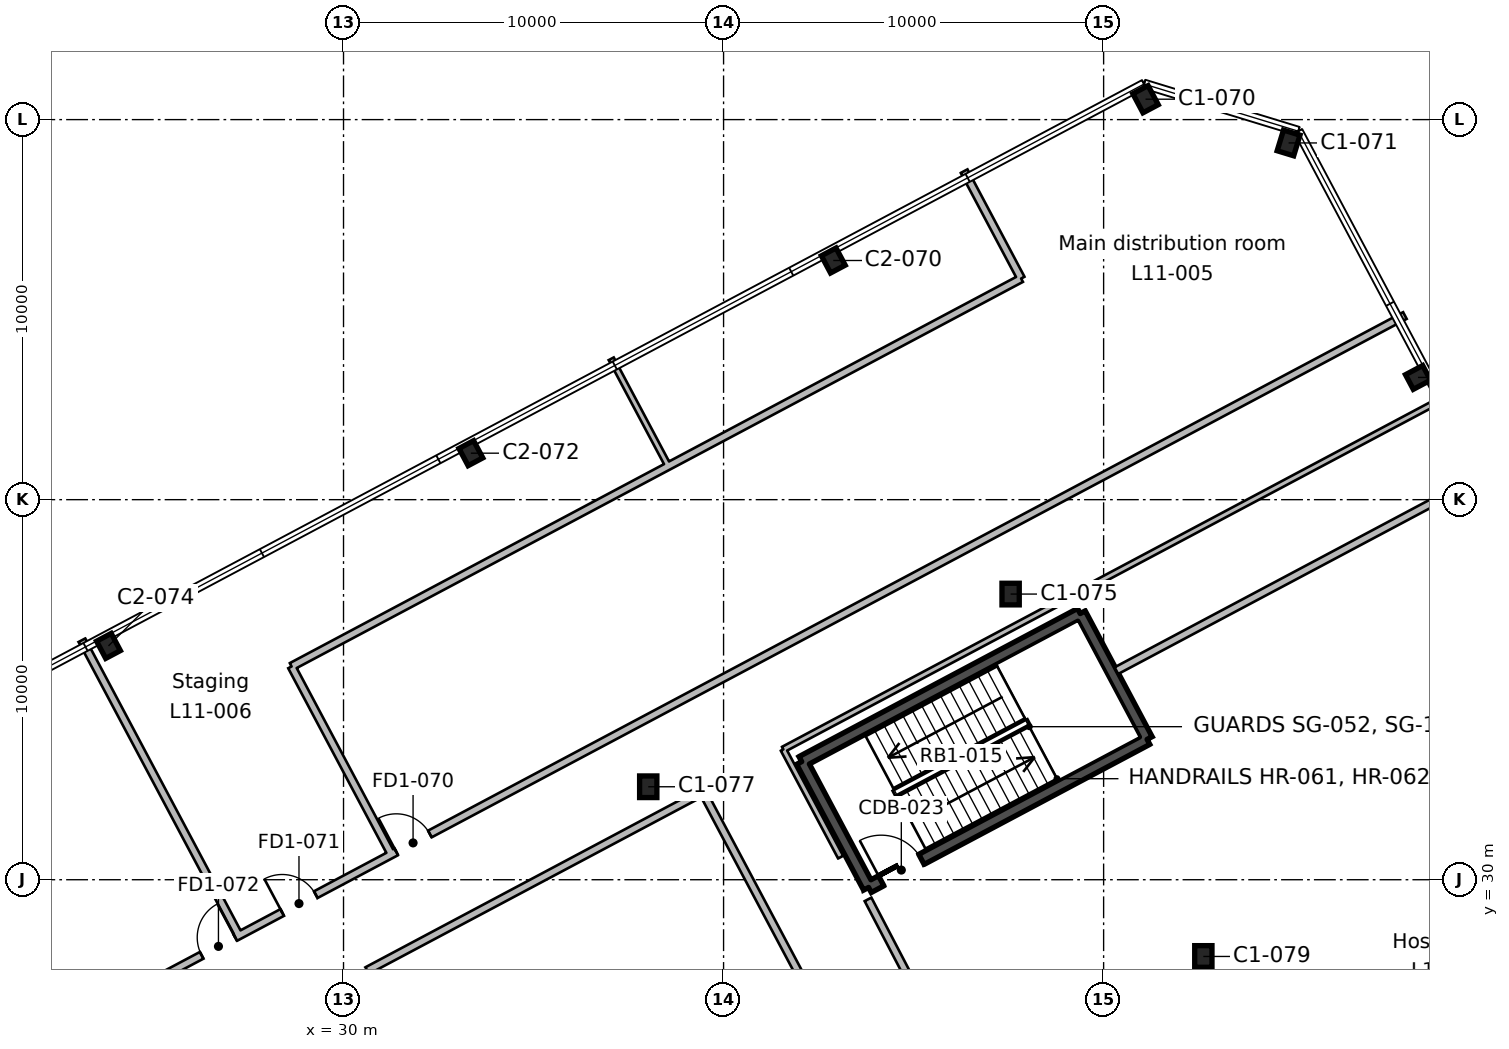
"""IFC4 building model, lengths in metres.
Left out: names, types, materials, properties, quantities, classifications, styles, units other than length and angle.
Written with IfcOpenShell. Run it as: python <this file> out.ifc"""

import sys

from ifc_helpers import new_model, si_unit, direction, frame, frame_2d, origin, origin_2d, place, context, subcontext, project, spatial, rectangle, i_section, extrude, element, fill, save


model = new_model("IFC4")
c1 = context("Model", 3, precision=1e-05, world=origin(), true_north=direction((0.0, 1.0)))
c2 = subcontext(c1, "Body", "Model", "MODEL_VIEW")
j1 = project(units=[si_unit("LENGTHUNIT", "METRE"), si_unit("PLANEANGLEUNIT", "RADIAN")], contexts=[c1])
p1 = place(None, origin())
s1 = spatial("IfcSite", under=j1, at=p1, CompositionType="ELEMENT")
p2 = place(p1, origin())
s2 = spatial("IfcBuilding", under=s1, at=p2, CompositionType="ELEMENT")
p3 = place(p2, frame((0.0, 0.0, 60.8)))
s3 = spatial("IfcBuildingStorey", under=s2, at=p3, CompositionType="ELEMENT", Elevation=60.8)
for number, where, z_axis, x_axis in (
    (1, (52.624, 27.981, 0.0), (0.0, 0.0, 1.0), (1.0, 0.0, 0.0)),
    (2, (38.018, 32.446, 0.0), (0.0, 0.0, 1.0), (1.0, 0.0, 0.0)),
):
    element("IfcColumn", number, at=place(p3, frame(where, z_axis=z_axis, x_axis=x_axis)), inside=s3, PredefinedType="COLUMN", context=c2, shape_type="SweptSolid", body=[
        extrude(i_section(OverallWidth=0.455, OverallDepth=0.569, WebThickness=0.078, FlangeThickness=0.125, FilletRadius=0.015, at=origin_2d()), origin(), (0.0, 0.0, 1.0), 5.4),
    ])
p4 = place(p3, frame((23.815, 36.152, 0.0), z_axis=(0.0, 0.0, 1.0), x_axis=(-0.882947592859, -0.469471562786, 0.0)))
e3 = element("IfcColumn", 3, at=p4, inside=s3, PredefinedType="COLUMN", context=c2, shape_type="SweptSolid", body=[
    extrude(i_section(OverallWidth=0.437, OverallDepth=0.513, WebThickness=0.061, FlangeThickness=0.097, FilletRadius=0.015, at=origin_2d()), origin(), (0.0, 0.0, 1.0), 5.4),
])
p5 = place(p3, frame((47.553, 37.516, 0.0), z_axis=(0.0, 0.0, 1.0), x_axis=(1.0, 0.0, 0.0)))
e4 = element("IfcColumn", 4, at=p5, inside=s3, PredefinedType="COLUMN", context=c2, shape_type="SweptSolid", body=[
    extrude(i_section(OverallWidth=0.455, OverallDepth=0.569, WebThickness=0.078, FlangeThickness=0.125, FilletRadius=0.015, at=origin_2d()), origin(), (0.0, 0.0, 1.0), 5.4),
])
for number, where, z_axis, x_axis in (
    (5, (33.351, 41.223, 0.0), (0.0, 0.0, 1.0), (-0.883, -0.469, 0.0)),
    (6, (58.272, 43.216, 0.0), (0.0, 0.0, 1.0), (-0.469, 0.883, 0.0)),
    (7, (42.887, 46.293, 0.0), (0.0, 0.0, 1.0), (-0.883, -0.469, 0.0)),
):
    element("IfcColumn", number, at=place(p3, frame(where, z_axis=z_axis, x_axis=x_axis)), inside=s3, PredefinedType="COLUMN", context=c2, shape_type="SweptSolid", body=[
        extrude(i_section(OverallWidth=0.437, OverallDepth=0.513, WebThickness=0.061, FlangeThickness=0.097, FilletRadius=0.015, at=origin_2d()), origin(), (0.0, 0.0, 1.0), 5.4),
    ])
for number, where, z_axis, x_axis in (
    (8, (54.867, 49.386, 0.0), (0.0, 0.0, 1.0), (-0.956, 0.292, 0.0)),
    (9, (51.103, 50.537, 0.0), (0.0, 0.0, 1.0), (-0.883, -0.469, 0.0)),
):
    element("IfcColumn", number, at=place(p3, frame(where, z_axis=z_axis, x_axis=x_axis)), inside=s3, PredefinedType="COLUMN", context=c2, shape_type="SweptSolid", body=[
        extrude(i_section(OverallWidth=0.455, OverallDepth=0.569, WebThickness=0.078, FlangeThickness=0.125, FilletRadius=0.015, at=origin_2d()), origin(), (0.0, 0.0, 1.0), 5.4),
    ])
p6 = place(p3, frame((49.384, 37.004, 0.0), z_axis=(0.0, 0.0, 1.0), x_axis=(0.46946936446, -0.882948761726, 0.0)))
e10 = element("IfcWall", 10, at=p6, inside=s3, PredefinedType="SHEAR", context=c2, shape_type="SweptSolid", body=[
    extrude(rectangle(XDim=3.75, YDim=0.3, at=frame_2d((1.875, 0.0))), origin(), (0.0, 0.0, 1.0), 5.4),
])
p7 = place(p3, frame((51.145, 33.693, 0.0), z_axis=(0.0, 0.0, 1.0), x_axis=(-0.882945809314, -0.469474917132, 0.0)))
e11 = element("IfcWall", 11, at=p7, inside=s3, PredefinedType="SHEAR", context=c2, shape_type="SweptSolid", body=[
    extrude(rectangle(XDim=8.3, YDim=0.3, at=frame_2d((4.15, 0.0))), origin(), (0.0, 0.0, 1.0), 5.4),
])
p8 = place(p7, frame((6.725, 0.0, 0.0)))
e12 = element("IfcOpeningElement", 12, at=p8, cuts=e11, PredefinedType="OPENING", context=c2, shape_type="SweptSolid", body=[
    extrude(rectangle(XDim=1.2, YDim=2.1, at=frame_2d((0.6, 1.05))), frame((0.0, 0.16, 0.0), z_axis=(0.0, -1.0, 0.0), x_axis=(1.0, 0.0, 0.0)), (0.0, 0.0, 1.0), 0.32),
])
p9 = place(p3, frame((43.816, 29.796, 0.0), z_axis=(0.0, 0.0, 1.0), x_axis=(-0.46946936446, 0.882948761726, 0.0)))
e13 = element("IfcWall", 13, at=p9, inside=s3, PredefinedType="SHEAR", context=c2, shape_type="SweptSolid", body=[
    extrude(rectangle(XDim=3.75, YDim=0.3, at=frame_2d((1.875, 0.0))), origin(), (0.0, 0.0, 1.0), 5.4),
])
p10 = place(p3, frame((42.055, 33.107, 0.0), z_axis=(0.0, 0.0, 1.0), x_axis=(0.882945809314, 0.469474917132, 0.0)))
e14 = element("IfcWall", 14, at=p10, inside=s3, PredefinedType="SHEAR", context=c2, shape_type="SweptSolid", body=[
    extrude(rectangle(XDim=8.3, YDim=0.3, at=frame_2d((4.15, 0.0))), origin(), (0.0, 0.0, 1.0), 5.4),
])
p11 = place(p3, frame((0.0, 14.044, 0.0), z_axis=(0.0, 0.0, 1.0), x_axis=(0.882943219941, 0.469479786955, 0.0)))
e15 = element("IfcWall", 15, at=p11, inside=s3, PredefinedType="PARTITIONING", context=c2, shape_type="SweptSolid", body=[
    extrude(rectangle(XDim=65.607, YDim=0.2, at=frame_2d((32.803, 0.0))), origin(), (0.0, 0.0, 1.0), 5.0),
])
p12 = place(p11, frame((35.55, 0.0, 0.0)))
e16 = element("IfcOpeningElement", 16, at=p12, cuts=e15, PredefinedType="OPENING", context=c2, shape_type="SweptSolid", body=[
    extrude(rectangle(XDim=1.0, YDim=2.1, at=frame_2d((0.5, 1.05))), frame((0.0, 0.11, 0.0), z_axis=(0.0, -1.0, 0.0), x_axis=(1.0, 0.0, 0.0)), (0.0, 0.0, 1.0), 0.22),
])
p13 = place(p11, frame((32.15, 0.0, 0.0)))
e17 = element("IfcOpeningElement", 17, at=p13, cuts=e15, PredefinedType="OPENING", context=c2, shape_type="SweptSolid", body=[
    extrude(rectangle(XDim=1.0, YDim=2.1, at=frame_2d((0.5, 1.05))), frame((0.0, 0.11, 0.0), z_axis=(0.0, -1.0, 0.0), x_axis=(1.0, 0.0, 0.0)), (0.0, 0.0, 1.0), 0.22),
])
p14 = place(p11, frame((29.75, 0.0, 0.0)))
e18 = element("IfcOpeningElement", 18, at=p14, cuts=e15, PredefinedType="OPENING", context=c2, shape_type="SweptSolid", body=[
    extrude(rectangle(XDim=1.0, YDim=2.1, at=frame_2d((0.5, 1.05))), frame((0.0, 0.11, 0.0), z_axis=(0.0, -1.0, 0.0), x_axis=(1.0, 0.0, 0.0)), (0.0, 0.0, 1.0), 0.22),
])
p15 = place(p11, frame((13.95, 0.0, 0.0)))
e19 = element("IfcOpeningElement", 19, at=p15, cuts=e15, PredefinedType="OPENING", context=c2, shape_type="SweptSolid", body=[
    extrude(rectangle(XDim=1.0, YDim=2.1, at=frame_2d((0.5, 1.05))), frame((0.0, 0.11, 0.0), z_axis=(0.0, -1.0, 0.0), x_axis=(1.0, 0.0, 0.0)), (0.0, 0.0, 1.0), 0.22),
])
p16 = place(p3, frame((23.117, 36.302, 0.0), z_axis=(0.0, 0.0, 1.0), x_axis=(0.469532456729, -0.882915212281, 0.0)))
e20 = element("IfcWall", 20, at=p16, inside=s3, PredefinedType="PARTITIONING", context=c2, shape_type="SweptSolid", body=[
    extrude(rectangle(XDim=8.8, YDim=0.2, at=frame_2d((4.4, 0.0))), origin(), (0.0, 0.0, 1.0), 5.0),
])
p17 = place(p3, frame((31.254, 30.682, 0.0), z_axis=(0.0, 0.0, 1.0), x_axis=(-0.469464286377, 0.882951461756, 0.0)))
e21 = element("IfcWall", 21, at=p17, inside=s3, PredefinedType="PARTITIONING", context=c2, shape_type="SweptSolid", body=[
    extrude(rectangle(XDim=5.583, YDim=0.2, at=frame_2d((2.791, 0.0))), origin(), (0.0, 0.0, 1.0), 5.0),
])
p18 = place(p3, frame((28.633, 35.611, 0.0), z_axis=(0.0, 0.0, 1.0), x_axis=(0.882938561172, 0.469488548524, 0.0)))
e22 = element("IfcWall", 22, at=p18, inside=s3, PredefinedType="PARTITIONING", context=c2, shape_type="SweptSolid", body=[
    extrude(rectangle(XDim=11.227, YDim=0.2, at=frame_2d((5.614, 0.0))), origin(), (0.0, 0.0, 1.0), 5.0),
])
p19 = place(p3, frame((37.044, 43.707, 0.0), z_axis=(0.0, 0.0, 1.0), x_axis=(0.469447181805, -0.882960556025, 0.0)))
e23 = element("IfcWall", 23, at=p19, inside=s3, PredefinedType="PARTITIONING", context=c2, shape_type="SweptSolid", body=[
    extrude(rectangle(XDim=3.199, YDim=0.15, at=frame_2d((1.6, 0.0))), origin(), (0.0, 0.0, 1.0), 5.0),
])
p20 = place(p3, frame((38.546, 40.882, 0.0), z_axis=(0.0, 0.0, 1.0), x_axis=(0.88296536188, 0.469438142592, 0.0)))
e24 = element("IfcWall", 24, at=p20, inside=s3, PredefinedType="PARTITIONING", context=c2, shape_type="SweptSolid", body=[
    extrude(rectangle(XDim=10.515, YDim=0.2, at=frame_2d((5.257, 0.0))), origin(), (0.0, 0.0, 1.0), 5.0),
])
p21 = place(p3, frame((47.83, 45.818, 0.0), z_axis=(0.0, 0.0, 1.0), x_axis=(-0.469082703107, 0.883154243406, 0.0)))
e25 = element("IfcWall", 25, at=p21, inside=s3, PredefinedType="PARTITIONING", context=c2, shape_type="SweptSolid", body=[
    extrude(rectangle(XDim=3.2, YDim=0.2, at=frame_2d((1.6, 0.0))), origin(), (0.0, 0.0, 1.0), 5.0),
])
p22 = place(p3, frame((59.054, 42.725, 0.0), z_axis=(0.0, 0.0, 1.0), x_axis=(-0.882950585831, -0.469465933781, 0.0)))
e26 = element("IfcWall", 26, at=p22, inside=s3, PredefinedType="PARTITIONING", context=c2, shape_type="SweptSolid", body=[
    extrude(rectangle(XDim=19.8, YDim=0.15, at=frame_2d((9.9, 0.0))), origin(), (0.0, 0.0, 1.0), 5.0),
])
p23 = place(p3, frame((41.572, 33.43, 0.0), z_axis=(0.0, 0.0, 1.0), x_axis=(0.469510863882, -0.882926694974, 0.0)))
e27 = element("IfcWall", 27, at=p23, inside=s3, PredefinedType="PARTITIONING", context=c2, shape_type="SweptSolid", body=[
    extrude(rectangle(XDim=3.212, YDim=0.15, at=frame_2d((1.606, 0.0))), origin(), (0.0, 0.0, 1.0), 5.0),
])
p24 = place(p3, frame((43.801, 29.483, 0.0), z_axis=(0.0, 0.0, 1.0), x_axis=(0.462864260364, -0.886429171721, 0.0)))
e28 = element("IfcWall", 28, at=p24, inside=s3, PredefinedType="PARTITIONING", context=c2, shape_type="SweptSolid", body=[
    extrude(rectangle(XDim=15.469, YDim=0.2, at=frame_2d((7.734, 0.0))), origin(), (0.0, 0.0, 1.0), 5.0),
])
p25 = place(p3, frame((50.336, 35.501, 0.0), z_axis=(0.0, 0.0, 1.0), x_axis=(0.88295860562, 0.469450850209, 0.0)))
e29 = element("IfcWall", 29, at=p25, inside=s3, PredefinedType="PARTITIONING", context=c2, shape_type="SweptSolid", body=[
    extrude(rectangle(XDim=11.089, YDim=0.2, at=frame_2d((5.544, 0.0))), origin(), (0.0, 0.0, 1.0), 5.0),
])
p26 = place(p3, frame((30.623, 27.608, 0.0), z_axis=(0.0, 0.0, 1.0), x_axis=(0.882940863385, 0.469484218867, 0.0)))
e30 = element("IfcWall", 30, at=p26, inside=s3, PredefinedType="PARTITIONING", context=c2, shape_type="SweptSolid", body=[
    extrude(rectangle(XDim=10.0, YDim=0.2, at=frame_2d((5.0, 0.0))), origin(), (0.0, 0.0, 1.0), 5.0),
])
p27 = place(p3, frame((39.453, 32.303, 0.0), z_axis=(0.0, 0.0, 1.0), x_axis=(0.469461333319, -0.882953031887, 0.0)))
e31 = element("IfcWall", 31, at=p27, inside=s3, PredefinedType="PARTITIONING", context=c2, shape_type="SweptSolid", body=[
    extrude(rectangle(XDim=20.0, YDim=0.2, at=frame_2d((10.0, 0.0))), origin(), (0.0, 0.0, 1.0), 5.0),
])
p28 = place(p3, frame((40.013, 9.949, 0.0), z_axis=(0.0, 0.0, 1.0), x_axis=(-0.469489882812, 0.882937851685, 0.0)))
e32 = element("IfcWall", 32, at=p28, inside=s3, PredefinedType="PARTITIONING", context=c2, shape_type="SweptSolid", body=[
    extrude(rectangle(XDim=20.0, YDim=0.2, at=frame_2d((10.0, 0.0))), origin(), (0.0, 0.0, 1.0), 5.0),
])
p29 = place(p28, frame((9.55, 0.0, 0.0)))
e33 = element("IfcOpeningElement", 33, at=p29, cuts=e32, PredefinedType="OPENING", context=c2, shape_type="SweptSolid", body=[
    extrude(rectangle(XDim=1.0, YDim=2.1, at=frame_2d((0.5, 1.05))), frame((0.0, 0.11, 0.0), z_axis=(0.0, -1.0, 0.0), x_axis=(1.0, 0.0, 0.0)), (0.0, 0.0, 1.0), 0.22),
])
p30 = place(p8, frame((1.2, 0.0, 0.0), z_axis=(0.0, 0.0, 1.0), x_axis=(-1.0, 0.0, 0.0)))
e34 = element("IfcDoor", 34, at=p30, inside=s3, OperationType="SINGLE_SWING_LEFT", PredefinedType="DOOR", context=c2, shape_type="SweptSolid", body=[
    extrude(rectangle(XDim=1.2, YDim=2.1, at=frame_2d((0.6, 1.05))), frame((0.0, 0.025, 0.0), z_axis=(0.0, -1.0, 0.0), x_axis=(1.0, 0.0, 0.0)), (0.0, 0.0, 1.0), 0.05),
])
fill(e12, e34)
p31 = place(p12, origin())
e35 = element("IfcDoor", 35, at=p31, inside=s3, OperationType="SINGLE_SWING_LEFT", PredefinedType="DOOR", context=c2, shape_type="SweptSolid", body=[
    extrude(rectangle(XDim=1.0, YDim=2.1, at=frame_2d((0.5, 1.05))), frame((0.0, 0.025, 0.0), z_axis=(0.0, -1.0, 0.0), x_axis=(1.0, 0.0, 0.0)), (0.0, 0.0, 1.0), 0.05),
])
fill(e16, e35)
p32 = place(p13, origin())
e36 = element("IfcDoor", 36, at=p32, inside=s3, OperationType="SINGLE_SWING_LEFT", PredefinedType="DOOR", context=c2, shape_type="SweptSolid", body=[
    extrude(rectangle(XDim=1.0, YDim=2.1, at=frame_2d((0.5, 1.05))), frame((0.0, 0.025, 0.0), z_axis=(0.0, -1.0, 0.0), x_axis=(1.0, 0.0, 0.0)), (0.0, 0.0, 1.0), 0.05),
])
fill(e17, e36)
p33 = place(p14, origin())
e37 = element("IfcDoor", 37, at=p33, inside=s3, OperationType="SINGLE_SWING_RIGHT", PredefinedType="DOOR", context=c2, shape_type="SweptSolid", body=[
    extrude(rectangle(XDim=1.0, YDim=2.1, at=frame_2d((0.5, 1.05))), frame((0.0, 0.025, 0.0), z_axis=(0.0, -1.0, 0.0), x_axis=(1.0, 0.0, 0.0)), (0.0, 0.0, 1.0), 0.05),
])
fill(e18, e37)
save(model, sys.argv[1])
